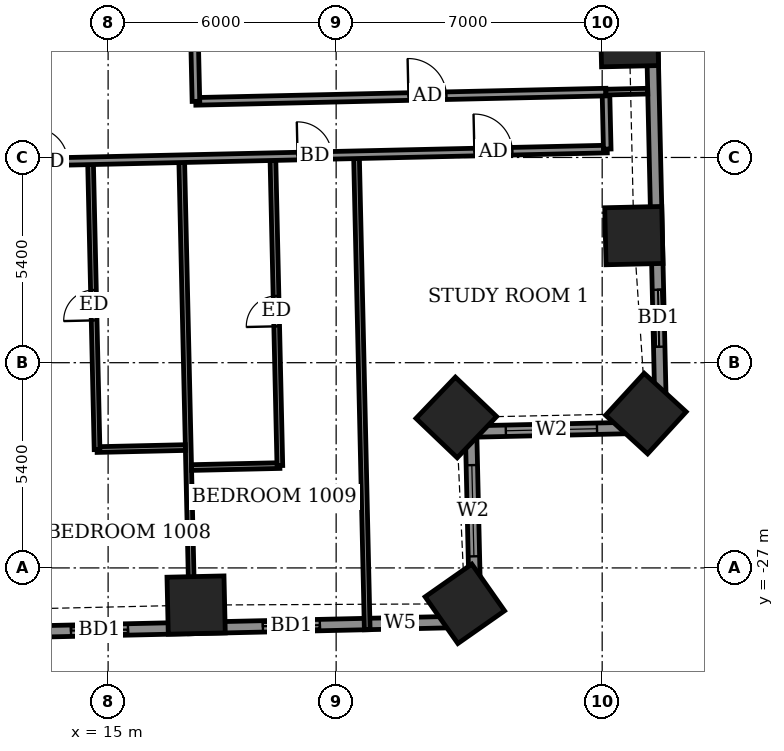
"""IFC4 building model, lengths in metres.
Left out: names, types, materials, properties, quantities, classifications, styles, units other than length and angle.
Written with IfcOpenShell. Run it as: python <this file> out.ifc"""

import sys

from ifc_helpers import new_model, si_unit, direction, frame, frame_2d, origin, origin_2d, place, context, subcontext, project, spatial, rectangle, extrude, element, fill, save


model = new_model("IFC4")
c1 = context("Model", 3, precision=1e-05, world=origin(), true_north=direction((0.0, 1.0)))
c2 = subcontext(c1, "Body", "Model", "MODEL_VIEW")
j1 = project(units=[si_unit("LENGTHUNIT", "METRE"), si_unit("PLANEANGLEUNIT", "RADIAN")], contexts=[c1])
p1 = place(None, origin())
s1 = spatial("IfcSite", under=j1, at=p1, CompositionType="ELEMENT")
p2 = place(p1, origin())
s2 = spatial("IfcBuilding", under=s1, at=p2, CompositionType="ELEMENT")
p3 = place(p2, frame((0.0, 0.0, 44.9)))
s3 = spatial("IfcBuildingStorey", under=s2, at=p3, CompositionType="ELEMENT", Elevation=44.9)
for number, where, z_axis, x_axis in (
    (1, (17.316, -27.977, -0.55), (0.0, 0.0, 1.0), (1.0, 0.023, 0.0)),
    (2, (24.386, -27.944, -0.55), (0.0, 0.0, 1.0), (0.819, 0.574, 0.0)),
    (3, (24.162, -23.041, -0.55), (0.0, 0.0, 1.0), (0.691, 0.723, 0.0)),
    (4, (29.15, -22.938, -0.55), (0.0, 0.0, 1.0), (0.676, 0.737, 0.0)),
    (5, (28.834, -18.256, -0.55), (0.0, 0.0, 1.0), (-0.023, 1.0, 0.0)),
    (6, (28.716, -13.049, -0.55), (0.0, 0.0, 1.0), (-0.023, 1.0, 0.0)),
):
    element("IfcColumn", number, at=place(p3, frame(where, z_axis=z_axis, x_axis=x_axis)), inside=s3, PredefinedType="COLUMN", context=c2, shape_type="SweptSolid", body=[
        extrude(rectangle(XDim=1.5, YDim=1.5, at=origin_2d()), origin(), (0.0, 0.0, 1.0), 3.6),
    ])
p4 = place(p3, frame((29.549, -23.299, 0.0), z_axis=(0.0, 0.0, 1.0), x_axis=(-0.022670336976, 0.999742994885, 0.0)))
e7 = element("IfcWall", 7, at=p4, inside=s3, PredefinedType="SOLIDWALL", context=c2, shape_type="SweptSolid", body=[
    extrude(rectangle(XDim=15.529, YDim=0.3, at=frame_2d((7.765, 0.0))), origin(), (0.0, 0.0, 1.0), 3.05),
])
p5 = place(p4, frame((2.119, 0.0, 0.0)))
e8 = element("IfcOpeningElement", 8, at=p5, cuts=e7, PredefinedType="OPENING", context=c2, shape_type="SweptSolid", body=[
    extrude(rectangle(XDim=1.5, YDim=2.4, at=frame_2d((0.75, 1.2))), frame((0.0, 0.16, 0.0), z_axis=(0.0, -1.0, 0.0), x_axis=(1.0, 0.0, 0.0)), (0.0, 0.0, 1.0), 0.32),
])
p6 = place(p4, frame((11.183, 0.0, 0.9)))
e9 = element("IfcOpeningElement", 9, at=p6, cuts=e7, PredefinedType="OPENING", context=c2, shape_type="SweptSolid", body=[
    extrude(rectangle(XDim=0.9, YDim=1.5, at=frame_2d((0.45, 0.75))), frame((0.0, 0.16, 0.0), z_axis=(0.0, -1.0, 0.0), x_axis=(1.0, 0.0, 0.0)), (0.0, 0.0, 1.0), 0.32),
])
p7 = place(p4, frame((13.087, 0.0, 0.9)))
e10 = element("IfcOpeningElement", 10, at=p7, cuts=e7, PredefinedType="OPENING", context=c2, shape_type="SweptSolid", body=[
    extrude(rectangle(XDim=1.2, YDim=1.5, at=frame_2d((0.6, 0.75))), frame((0.0, 0.16, 0.0), z_axis=(0.0, -1.0, 0.0), x_axis=(1.0, 0.0, 0.0)), (0.0, 0.0, 1.0), 0.32),
])
p8 = place(p3, frame((-27.423, -29.593, 0.0), z_axis=(0.0, 0.0, 1.0), x_axis=(0.999742563204, 0.022689365739, 0.0)))
e11 = element("IfcWall", 11, at=p8, inside=s3, PredefinedType="SOLIDWALL", context=c2, shape_type="SweptSolid", body=[
    extrude(rectangle(XDim=52.101, YDim=0.3, at=frame_2d((26.05, 0.0))), origin(), (0.0, 0.0, 1.0), 3.05),
])
p9 = place(p8, frame((3.162, 0.0, 0.0)))
e12 = element("IfcOpeningElement", 12, at=p9, cuts=e11, PredefinedType="OPENING", context=c2, shape_type="SweptSolid", body=[
    extrude(rectangle(XDim=1.5, YDim=2.4, at=frame_2d((0.75, 1.2))), frame((0.0, 0.16, 0.0), z_axis=(0.0, -1.0, 0.0), x_axis=(1.0, 0.0, 0.0)), (0.0, 0.0, 1.0), 0.32),
])
p10 = place(p8, frame((9.168, 0.0, 0.0)))
e13 = element("IfcOpeningElement", 13, at=p10, cuts=e11, PredefinedType="OPENING", context=c2, shape_type="SweptSolid", body=[
    extrude(rectangle(XDim=1.5, YDim=2.4, at=frame_2d((0.75, 1.2))), frame((0.0, 0.16, 0.0), z_axis=(0.0, -1.0, 0.0), x_axis=(1.0, 0.0, 0.0)), (0.0, 0.0, 1.0), 0.32),
])
p11 = place(p8, frame((12.411, 0.0, 0.0)))
e14 = element("IfcOpeningElement", 14, at=p11, cuts=e11, PredefinedType="OPENING", context=c2, shape_type="SweptSolid", body=[
    extrude(rectangle(XDim=1.5, YDim=2.4, at=frame_2d((0.75, 1.2))), frame((0.0, 0.16, 0.0), z_axis=(0.0, -1.0, 0.0), x_axis=(1.0, 0.0, 0.0)), (0.0, 0.0, 1.0), 0.32),
])
p12 = place(p8, frame((18.275, 0.0, 0.0)))
e15 = element("IfcOpeningElement", 15, at=p12, cuts=e11, PredefinedType="OPENING", context=c2, shape_type="SweptSolid", body=[
    extrude(rectangle(XDim=1.5, YDim=2.4, at=frame_2d((0.75, 1.2))), frame((0.0, 0.16, 0.0), z_axis=(0.0, -1.0, 0.0), x_axis=(1.0, 0.0, 0.0)), (0.0, 0.0, 1.0), 0.32),
])
p13 = place(p8, frame((23.603, 0.0, 0.0)))
e16 = element("IfcOpeningElement", 16, at=p13, cuts=e11, PredefinedType="OPENING", context=c2, shape_type="SweptSolid", body=[
    extrude(rectangle(XDim=1.5, YDim=2.4, at=frame_2d((0.75, 1.2))), frame((0.0, 0.16, 0.0), z_axis=(0.0, -1.0, 0.0), x_axis=(1.0, 0.0, 0.0)), (0.0, 0.0, 1.0), 0.32),
])
p14 = place(p8, frame((26.846, 0.0, 0.0)))
e17 = element("IfcOpeningElement", 17, at=p14, cuts=e11, PredefinedType="OPENING", context=c2, shape_type="SweptSolid", body=[
    extrude(rectangle(XDim=1.5, YDim=2.4, at=frame_2d((0.75, 1.2))), frame((0.0, 0.16, 0.0), z_axis=(0.0, -1.0, 0.0), x_axis=(1.0, 0.0, 0.0)), (0.0, 0.0, 1.0), 0.32),
])
p15 = place(p8, frame((31.975, 0.0, 0.0)))
e18 = element("IfcOpeningElement", 18, at=p15, cuts=e11, PredefinedType="OPENING", context=c2, shape_type="SweptSolid", body=[
    extrude(rectangle(XDim=1.5, YDim=2.4, at=frame_2d((0.75, 1.2))), frame((0.0, 0.16, 0.0), z_axis=(0.0, -1.0, 0.0), x_axis=(1.0, 0.0, 0.0)), (0.0, 0.0, 1.0), 0.32),
])
p16 = place(p8, frame((38.214, 0.0, 0.0)))
e19 = element("IfcOpeningElement", 19, at=p16, cuts=e11, PredefinedType="OPENING", context=c2, shape_type="SweptSolid", body=[
    extrude(rectangle(XDim=1.5, YDim=2.4, at=frame_2d((0.75, 1.2))), frame((0.0, 0.16, 0.0), z_axis=(0.0, -1.0, 0.0), x_axis=(1.0, 0.0, 0.0)), (0.0, 0.0, 1.0), 0.32),
])
p17 = place(p8, frame((41.457, 0.0, 0.0)))
e20 = element("IfcOpeningElement", 20, at=p17, cuts=e11, PredefinedType="OPENING", context=c2, shape_type="SweptSolid", body=[
    extrude(rectangle(XDim=1.5, YDim=2.4, at=frame_2d((0.75, 1.2))), frame((0.0, 0.16, 0.0), z_axis=(0.0, -1.0, 0.0), x_axis=(1.0, 0.0, 0.0)), (0.0, 0.0, 1.0), 0.32),
])
p18 = place(p8, frame((46.507, 0.0, 0.0)))
e21 = element("IfcOpeningElement", 21, at=p18, cuts=e11, PredefinedType="OPENING", context=c2, shape_type="SweptSolid", body=[
    extrude(rectangle(XDim=1.5, YDim=2.4, at=frame_2d((0.75, 1.2))), frame((0.0, 0.16, 0.0), z_axis=(0.0, -1.0, 0.0), x_axis=(1.0, 0.0, 0.0)), (0.0, 0.0, 1.0), 0.32),
])
p19 = place(p8, frame((49.671, 0.0, 0.9)))
e22 = element("IfcOpeningElement", 22, at=p19, cuts=e11, PredefinedType="OPENING", context=c2, shape_type="SweptSolid", body=[
    extrude(rectangle(XDim=0.9, YDim=1.5, at=frame_2d((0.45, 0.75))), frame((0.0, 0.16, 0.0), z_axis=(0.0, -1.0, 0.0), x_axis=(1.0, 0.0, 0.0)), (0.0, 0.0, 1.0), 0.32),
])
p20 = place(p3, frame((24.664, -28.411, 0.0), z_axis=(0.0, 0.0, 1.0), x_axis=(-0.022802372469, 0.999739992103, 0.0)))
e23 = element("IfcWall", 23, at=p20, inside=s3, PredefinedType="SOLIDWALL", context=c2, shape_type="SweptSolid", body=[
    extrude(rectangle(XDim=5.0, YDim=0.3, at=frame_2d((2.5, 0.0))), origin(), (0.0, 0.0, 1.0), 2.55),
])
p21 = place(p20, frame((1.717, 0.0, 0.9)))
e24 = element("IfcOpeningElement", 24, at=p21, cuts=e23, PredefinedType="OPENING", context=c2, shape_type="SweptSolid", body=[
    extrude(rectangle(XDim=2.4, YDim=1.5, at=frame_2d((1.2, 0.75))), frame((0.0, 0.16, 0.0), z_axis=(0.0, -1.0, 0.0), x_axis=(1.0, 0.0, 0.0)), (0.0, 0.0, 1.0), 0.32),
])
p22 = place(p3, frame((24.55, -23.412, 0.0), z_axis=(0.0, 0.0, 1.0), x_axis=(0.999744450377, 0.022606059803, 0.0)))
e25 = element("IfcWall", 25, at=p22, inside=s3, PredefinedType="SOLIDWALL", context=c2, shape_type="SweptSolid", body=[
    extrude(rectangle(XDim=5.0, YDim=0.3, at=frame_2d((2.5, 0.0))), origin(), (0.0, 0.0, 1.0), 3.05),
])
p23 = place(p22, frame((0.915, 0.0, 0.9)))
e26 = element("IfcOpeningElement", 26, at=p23, cuts=e25, PredefinedType="OPENING", context=c2, shape_type="SweptSolid", body=[
    extrude(rectangle(XDim=2.4, YDim=1.5, at=frame_2d((1.2, 0.75))), frame((0.0, 0.16, 0.0), z_axis=(0.0, -1.0, 0.0), x_axis=(1.0, 0.0, 0.0)), (0.0, 0.0, 1.0), 0.32),
])
p24 = place(p3, frame((30.945, -20.917, 0.0), z_axis=(0.0, 0.0, 1.0), x_axis=(-0.022665943652, 0.999743094499, 0.0)))
e27 = element("IfcWall", 27, at=p24, inside=s3, PredefinedType="USERDEFINED", context=c2, shape_type="SweptSolid", body=[
    extrude(rectangle(XDim=6.0, YDim=0.55, at=frame_2d((3.0, 0.0))), origin(), (0.0, 0.0, 1.0), 0.8),
])
p25 = place(p3, frame((14.049, -30.102, 0.0), z_axis=(0.0, 0.0, 1.0), x_axis=(0.999743178102, 0.022662255828, 0.0)))
e28 = element("IfcWall", 28, at=p25, inside=s3, PredefinedType="USERDEFINED", context=c2, shape_type="SweptSolid", body=[
    extrude(rectangle(XDim=6.0, YDim=0.55, at=frame_2d((3.0, 0.0))), origin(), (0.0, 0.0, 1.0), 0.8),
])
p26 = place(p3, frame((17.219, -28.73, 0.0), z_axis=(0.0, 0.0, 1.0), x_axis=(-0.022661475803, 0.999743195783, 0.0)))
e29 = element("IfcWall", 29, at=p26, inside=s3, PredefinedType="PARTITIONING", context=c2, shape_type="SweptSolid", body=[
    extrude(rectangle(XDim=12.4, YDim=0.15, at=frame_2d((6.2, 0.0))), origin(), (0.0, 0.0, 1.0), 3.05),
])
p27 = place(p3, frame((21.818, -28.626, 0.0), z_axis=(0.0, 0.0, 1.0), x_axis=(-0.022661475803, 0.999743195783, 0.0)))
e30 = element("IfcWall", 30, at=p27, inside=s3, PredefinedType="PARTITIONING", context=c2, shape_type="SweptSolid", body=[
    extrude(rectangle(XDim=12.4, YDim=0.15, at=frame_2d((6.2, 0.0))), origin(), (0.0, 0.0, 1.0), 2.55),
])
p28 = place(p3, frame((17.195, -24.359, 0.0), z_axis=(0.0, 0.0, 1.0), x_axis=(0.999749744571, 0.022370700241, 0.0)))
e31 = element("IfcWall", 31, at=p28, inside=s3, PredefinedType="PARTITIONING", context=c2, shape_type="SweptSolid", body=[
    extrude(rectangle(XDim=2.324, YDim=0.15, at=frame_2d((1.162, 0.0))), origin(), (0.0, 0.0, 1.0), 3.05),
])
p29 = place(p3, frame((19.519, -24.307, 0.0), z_axis=(0.0, 0.0, 1.0), x_axis=(-0.022681348089, 0.999742745134, 0.0)))
e32 = element("IfcWall", 32, at=p29, inside=s3, PredefinedType="PARTITIONING", context=c2, shape_type="SweptSolid", body=[
    extrude(rectangle(XDim=8.03, YDim=0.15, at=frame_2d((4.015, 0.0))), origin(), (0.0, 0.0, 1.0), 3.05),
])
p30 = place(p29, frame((3.665, 0.0, 0.0)))
e33 = element("IfcOpeningElement", 33, at=p30, cuts=e32, PredefinedType="OPENING", context=c2, shape_type="SweptSolid", body=[
    extrude(rectangle(XDim=0.8, YDim=2.1, at=frame_2d((0.4, 1.05))), frame((0.0, 0.085, 0.0), z_axis=(0.0, -1.0, 0.0), x_axis=(1.0, 0.0, 0.0)), (0.0, 0.0, 1.0), 0.17),
])
p31 = place(p3, frame((14.709, -23.886, 0.0), z_axis=(0.0, 0.0, 1.0), x_axis=(0.999740260747, 0.02279059109, 0.0)))
e34 = element("IfcWall", 34, at=p31, inside=s3, PredefinedType="PARTITIONING", context=c2, shape_type="SweptSolid", body=[
    extrude(rectangle(XDim=2.324, YDim=0.15, at=frame_2d((1.162, 0.0))), origin(), (0.0, 0.0, 1.0), 3.05),
])
p32 = place(p3, frame((14.709, -23.886, 0.0), z_axis=(0.0, 0.0, 1.0), x_axis=(-0.022656334507, 0.999743312309, 0.0)))
e35 = element("IfcWall", 35, at=p32, inside=s3, PredefinedType="PARTITIONING", context=c2, shape_type="SweptSolid", body=[
    extrude(rectangle(XDim=7.5, YDim=0.15, at=frame_2d((3.75, 0.0))), origin(), (0.0, 0.0, 1.0), 3.05),
])
p33 = place(p32, frame((3.4, 0.0, 0.0)))
e36 = element("IfcOpeningElement", 36, at=p33, cuts=e35, PredefinedType="OPENING", context=c2, shape_type="SweptSolid", body=[
    extrude(rectangle(XDim=0.8, YDim=2.1, at=frame_2d((0.4, 1.05))), frame((0.0, 0.085, 0.0), z_axis=(0.0, -1.0, 0.0), x_axis=(1.0, 0.0, 0.0)), (0.0, 0.0, 1.0), 0.17),
])
p34 = place(p3, frame((-30.652, -17.313, 0.0), z_axis=(0.0, 0.0, 1.0), x_axis=(0.999742623764, 0.02268669719, 0.0)))
e37 = element("IfcWall", 37, at=p34, inside=s3, PredefinedType="PARTITIONING", context=c2, shape_type="SweptSolid", body=[
    extrude(rectangle(XDim=58.8, YDim=0.2, at=frame_2d((29.4, 0.0))), origin(), (0.0, 0.0, 1.0), 3.05),
])
p35 = place(p34, frame((2.6, 0.0, 0.0)))
e38 = element("IfcOpeningElement", 38, at=p35, cuts=e37, PredefinedType="OPENING", context=c2, shape_type="SweptSolid", body=[
    extrude(rectangle(XDim=1.0, YDim=2.1, at=frame_2d((0.5, 1.05))), frame((0.0, 0.11, 0.0), z_axis=(0.0, -1.0, 0.0), x_axis=(1.0, 0.0, 0.0)), (0.0, 0.0, 1.0), 0.22),
])
p36 = place(p34, frame((8.45, 0.0, 0.0)))
e39 = element("IfcOpeningElement", 39, at=p36, cuts=e37, PredefinedType="OPENING", context=c2, shape_type="SweptSolid", body=[
    extrude(rectangle(XDim=0.9, YDim=2.1, at=frame_2d((0.45, 1.05))), frame((0.0, 0.11, 0.0), z_axis=(0.0, -1.0, 0.0), x_axis=(1.0, 0.0, 0.0)), (0.0, 0.0, 1.0), 0.22),
])
p37 = place(p34, frame((13.325, 0.0, 0.0)))
e40 = element("IfcOpeningElement", 40, at=p37, cuts=e37, PredefinedType="OPENING", context=c2, shape_type="SweptSolid", body=[
    extrude(rectangle(XDim=0.9, YDim=2.1, at=frame_2d((0.45, 1.05))), frame((0.0, 0.11, 0.0), z_axis=(0.0, -1.0, 0.0), x_axis=(1.0, 0.0, 0.0)), (0.0, 0.0, 1.0), 0.22),
])
p38 = place(p34, frame((15.7, 0.0, 0.0)))
e41 = element("IfcOpeningElement", 41, at=p38, cuts=e37, PredefinedType="OPENING", context=c2, shape_type="SweptSolid", body=[
    extrude(rectangle(XDim=0.9, YDim=2.1, at=frame_2d((0.45, 1.05))), frame((0.0, 0.11, 0.0), z_axis=(0.0, -1.0, 0.0), x_axis=(1.0, 0.0, 0.0)), (0.0, 0.0, 1.0), 0.22),
])
p39 = place(p34, frame((22.725, 0.0, 0.0)))
e42 = element("IfcOpeningElement", 42, at=p39, cuts=e37, PredefinedType="OPENING", context=c2, shape_type="SweptSolid", body=[
    extrude(rectangle(XDim=0.9, YDim=2.1, at=frame_2d((0.45, 1.05))), frame((0.0, 0.11, 0.0), z_axis=(0.0, -1.0, 0.0), x_axis=(1.0, 0.0, 0.0)), (0.0, 0.0, 1.0), 0.22),
])
p40 = place(p34, frame((24.875, 0.0, 0.0)))
e43 = element("IfcOpeningElement", 43, at=p40, cuts=e37, PredefinedType="OPENING", context=c2, shape_type="SweptSolid", body=[
    extrude(rectangle(XDim=0.9, YDim=2.1, at=frame_2d((0.45, 1.05))), frame((0.0, 0.11, 0.0), z_axis=(0.0, -1.0, 0.0), x_axis=(1.0, 0.0, 0.0)), (0.0, 0.0, 1.0), 0.22),
])
p41 = place(p34, frame((31.825, 0.0, 0.0)))
e44 = element("IfcOpeningElement", 44, at=p41, cuts=e37, PredefinedType="OPENING", context=c2, shape_type="SweptSolid", body=[
    extrude(rectangle(XDim=0.9, YDim=2.1, at=frame_2d((0.45, 1.05))), frame((0.0, 0.11, 0.0), z_axis=(0.0, -1.0, 0.0), x_axis=(1.0, 0.0, 0.0)), (0.0, 0.0, 1.0), 0.22),
])
p42 = place(p34, frame((34.025, 0.0, 0.0)))
e45 = element("IfcOpeningElement", 45, at=p42, cuts=e37, PredefinedType="OPENING", context=c2, shape_type="SweptSolid", body=[
    extrude(rectangle(XDim=0.9, YDim=2.1, at=frame_2d((0.45, 1.05))), frame((0.0, 0.11, 0.0), z_axis=(0.0, -1.0, 0.0), x_axis=(1.0, 0.0, 0.0)), (0.0, 0.0, 1.0), 0.22),
])
p43 = place(p34, frame((41.325, 0.0, 0.0)))
e46 = element("IfcOpeningElement", 46, at=p43, cuts=e37, PredefinedType="OPENING", context=c2, shape_type="SweptSolid", body=[
    extrude(rectangle(XDim=0.9, YDim=2.1, at=frame_2d((0.45, 1.05))), frame((0.0, 0.11, 0.0), z_axis=(0.0, -1.0, 0.0), x_axis=(1.0, 0.0, 0.0)), (0.0, 0.0, 1.0), 0.22),
])
p44 = place(p34, frame((43.7, 0.0, 0.0)))
e47 = element("IfcOpeningElement", 47, at=p44, cuts=e37, PredefinedType="OPENING", context=c2, shape_type="SweptSolid", body=[
    extrude(rectangle(XDim=0.9, YDim=2.1, at=frame_2d((0.45, 1.05))), frame((0.0, 0.11, 0.0), z_axis=(0.0, -1.0, 0.0), x_axis=(1.0, 0.0, 0.0)), (0.0, 0.0, 1.0), 0.22),
])
p45 = place(p34, frame((50.65, 0.0, 0.0)))
e48 = element("IfcOpeningElement", 48, at=p45, cuts=e37, PredefinedType="OPENING", context=c2, shape_type="SweptSolid", body=[
    extrude(rectangle(XDim=0.9, YDim=2.1, at=frame_2d((0.45, 1.05))), frame((0.0, 0.11, 0.0), z_axis=(0.0, -1.0, 0.0), x_axis=(1.0, 0.0, 0.0)), (0.0, 0.0, 1.0), 0.22),
])
p46 = place(p34, frame((55.304, 0.0, 0.0)))
e49 = element("IfcOpeningElement", 49, at=p46, cuts=e37, PredefinedType="OPENING", context=c2, shape_type="SweptSolid", body=[
    extrude(rectangle(XDim=1.0, YDim=2.1, at=frame_2d((0.5, 1.05))), frame((0.0, 0.11, 0.0), z_axis=(0.0, -1.0, 0.0), x_axis=(1.0, 0.0, 0.0)), (0.0, 0.0, 1.0), 0.22),
])
p47 = place(p3, frame((28.133, -15.979, 0.0), z_axis=(0.0, 0.0, 1.0), x_axis=(-0.022632637625, 0.99974384905, 0.0)))
e50 = element("IfcWall", 50, at=p47, inside=s3, PredefinedType="PARTITIONING", context=c2, shape_type="SweptSolid", body=[
    extrude(rectangle(XDim=1.5, YDim=0.2, at=frame_2d((0.75, 0.0))), origin(), (0.0, 0.0, 1.0), 3.05),
])
p48 = place(p3, frame((17.306, -14.724, 0.0), z_axis=(0.0, 0.0, 1.0), x_axis=(0.999744269809, 0.022614043969, 0.0)))
e51 = element("IfcWall", 51, at=p48, inside=s3, PredefinedType="PARTITIONING", context=c2, shape_type="SweptSolid", body=[
    extrude(rectangle(XDim=10.796, YDim=0.2, at=frame_2d((5.398, 0.0))), origin(), (0.0, 0.0, 1.0), 3.05),
])
p49 = place(p48, frame((5.598, 0.0, 0.0)))
e52 = element("IfcOpeningElement", 52, at=p49, cuts=e51, PredefinedType="OPENING", context=c2, shape_type="SweptSolid", body=[
    extrude(rectangle(XDim=1.0, YDim=2.1, at=frame_2d((0.5, 1.05))), frame((0.0, 0.11, 0.0), z_axis=(0.0, -1.0, 0.0), x_axis=(1.0, 0.0, 0.0)), (0.0, 0.0, 1.0), 0.22),
])
p50 = place(p3, frame((17.311, -14.724, 0.0), z_axis=(0.0, 0.0, 1.0), x_axis=(-0.022562209343, 0.999745440955, 0.0)))
e53 = element("IfcWall", 53, at=p50, inside=s3, PredefinedType="PARTITIONING", context=c2, shape_type="SweptSolid", body=[
    extrude(rectangle(XDim=6.828, YDim=0.2, at=frame_2d((3.414, 0.0))), origin(), (0.0, 0.0, 1.0), 3.05),
])
p51 = place(p50, frame((4.612, 0.0, 0.0)))
e54 = element("IfcOpeningElement", 54, at=p51, cuts=e53, PredefinedType="OPENING", context=c2, shape_type="SweptSolid", body=[
    extrude(rectangle(XDim=1.0, YDim=2.1, at=frame_2d((0.5, 1.05))), frame((0.0, 0.11, 0.0), z_axis=(0.0, -1.0, 0.0), x_axis=(1.0, 0.0, 0.0)), (0.0, 0.0, 1.0), 0.22),
])
p52 = place(p3, frame((28.095, -14.48, 0.0), z_axis=(0.0, 0.0, 1.0), x_axis=(0.999745251335, 0.022570609924, 0.0)))
e55 = element("IfcWall", 55, at=p52, inside=s3, PredefinedType="PARTITIONING", context=c2, shape_type="SweptSolid", body=[
    extrude(rectangle(XDim=1.103, YDim=0.15, at=frame_2d((0.552, 0.0))), origin(), (0.0, 0.0, 1.0), 2.55),
])
p53 = place(p5, origin())
e56 = element("IfcDoor", 56, at=p53, inside=s3, OperationType="SLIDING_TO_LEFT", PredefinedType="DOOR", context=c2, shape_type="SweptSolid", body=[
    extrude(rectangle(XDim=1.5, YDim=2.4, at=frame_2d((0.75, 1.2))), frame((0.0, 0.025, 0.0), z_axis=(0.0, -1.0, 0.0), x_axis=(1.0, 0.0, 0.0)), (0.0, 0.0, 1.0), 0.05),
])
fill(e8, e56)
p54 = place(p17, origin())
e57 = element("IfcDoor", 57, at=p54, inside=s3, OperationType="SLIDING_TO_LEFT", PredefinedType="DOOR", context=c2, shape_type="SweptSolid", body=[
    extrude(rectangle(XDim=1.5, YDim=2.4, at=frame_2d((0.75, 1.2))), frame((0.0, 0.025, 0.0), z_axis=(0.0, -1.0, 0.0), x_axis=(1.0, 0.0, 0.0)), (0.0, 0.0, 1.0), 0.05),
])
fill(e20, e57)
p55 = place(p18, origin())
e58 = element("IfcDoor", 58, at=p55, inside=s3, OperationType="SLIDING_TO_LEFT", PredefinedType="DOOR", context=c2, shape_type="SweptSolid", body=[
    extrude(rectangle(XDim=1.5, YDim=2.4, at=frame_2d((0.75, 1.2))), frame((0.0, 0.025, 0.0), z_axis=(0.0, -1.0, 0.0), x_axis=(1.0, 0.0, 0.0)), (0.0, 0.0, 1.0), 0.05),
])
fill(e21, e58)
p56 = place(p19, origin())
e59 = element("IfcWindow", 59, at=p56, inside=s3, PartitioningType="SINGLE_PANEL", PredefinedType="WINDOW", context=c2, shape_type="SweptSolid", body=[
    extrude(rectangle(XDim=0.9, YDim=1.5, at=frame_2d((0.45, 0.75))), frame((0.0, 0.03, 0.0), z_axis=(0.0, -1.0, 0.0), x_axis=(1.0, 0.0, 0.0)), (0.0, 0.0, 1.0), 0.06),
])
fill(e22, e59)
p57 = place(p21, origin())
e60 = element("IfcWindow", 60, at=p57, inside=s3, PartitioningType="DOUBLE_PANEL_VERTICAL", PredefinedType="WINDOW", context=c2, shape_type="SweptSolid", body=[
    extrude(rectangle(XDim=2.4, YDim=1.5, at=frame_2d((1.2, 0.75))), frame((0.0, 0.03, 0.0), z_axis=(0.0, -1.0, 0.0), x_axis=(1.0, 0.0, 0.0)), (0.0, 0.0, 1.0), 0.06),
])
fill(e24, e60)
p58 = place(p23, origin())
e61 = element("IfcWindow", 61, at=p58, inside=s3, PartitioningType="DOUBLE_PANEL_VERTICAL", PredefinedType="WINDOW", context=c2, shape_type="SweptSolid", body=[
    extrude(rectangle(XDim=2.4, YDim=1.5, at=frame_2d((1.2, 0.75))), frame((0.0, 0.03, 0.0), z_axis=(0.0, -1.0, 0.0), x_axis=(1.0, 0.0, 0.0)), (0.0, 0.0, 1.0), 0.06),
])
fill(e26, e61)
p59 = place(p44, origin())
e62 = element("IfcDoor", 62, at=p59, inside=s3, OperationType="SINGLE_SWING_RIGHT", PredefinedType="DOOR", context=c2, shape_type="SweptSolid", body=[
    extrude(rectangle(XDim=0.9, YDim=2.1, at=frame_2d((0.45, 1.05))), frame((0.0, 0.025, 0.0), z_axis=(0.0, -1.0, 0.0), x_axis=(1.0, 0.0, 0.0)), (0.0, 0.0, 1.0), 0.05),
])
fill(e47, e62)
p60 = place(p33, origin())
e63 = element("IfcDoor", 63, at=p60, inside=s3, OperationType="SINGLE_SWING_RIGHT", PredefinedType="DOOR", context=c2, shape_type="SweptSolid", body=[
    extrude(rectangle(XDim=0.8, YDim=2.1, at=frame_2d((0.4, 1.05))), frame((0.0, 0.025, 0.0), z_axis=(0.0, -1.0, 0.0), x_axis=(1.0, 0.0, 0.0)), (0.0, 0.0, 1.0), 0.05),
])
fill(e36, e63)
p61 = place(p45, origin())
e64 = element("IfcDoor", 64, at=p61, inside=s3, OperationType="SINGLE_SWING_LEFT", PredefinedType="DOOR", context=c2, shape_type="SweptSolid", body=[
    extrude(rectangle(XDim=0.9, YDim=2.1, at=frame_2d((0.45, 1.05))), frame((0.0, 0.025, 0.0), z_axis=(0.0, -1.0, 0.0), x_axis=(1.0, 0.0, 0.0)), (0.0, 0.0, 1.0), 0.05),
])
fill(e48, e64)
p62 = place(p30, origin())
e65 = element("IfcDoor", 65, at=p62, inside=s3, OperationType="SINGLE_SWING_LEFT", PredefinedType="DOOR", context=c2, shape_type="SweptSolid", body=[
    extrude(rectangle(XDim=0.8, YDim=2.1, at=frame_2d((0.4, 1.05))), frame((0.0, 0.025, 0.0), z_axis=(0.0, -1.0, 0.0), x_axis=(1.0, 0.0, 0.0)), (0.0, 0.0, 1.0), 0.05),
])
fill(e33, e65)
p63 = place(p46, origin())
e66 = element("IfcDoor", 66, at=p63, inside=s3, OperationType="SINGLE_SWING_RIGHT", PredefinedType="DOOR", context=c2, shape_type="SweptSolid", body=[
    extrude(rectangle(XDim=1.0, YDim=2.1, at=frame_2d((0.5, 1.05))), frame((0.0, 0.025, 0.0), z_axis=(0.0, -1.0, 0.0), x_axis=(1.0, 0.0, 0.0)), (0.0, 0.0, 1.0), 0.05),
])
fill(e49, e66)
p64 = place(p49, origin())
e67 = element("IfcDoor", 67, at=p64, inside=s3, OperationType="SINGLE_SWING_LEFT", PredefinedType="DOOR", context=c2, shape_type="SweptSolid", body=[
    extrude(rectangle(XDim=1.0, YDim=2.1, at=frame_2d((0.5, 1.05))), frame((0.0, 0.025, 0.0), z_axis=(0.0, -1.0, 0.0), x_axis=(1.0, 0.0, 0.0)), (0.0, 0.0, 1.0), 0.05),
])
fill(e52, e67)
save(model, sys.argv[1])
